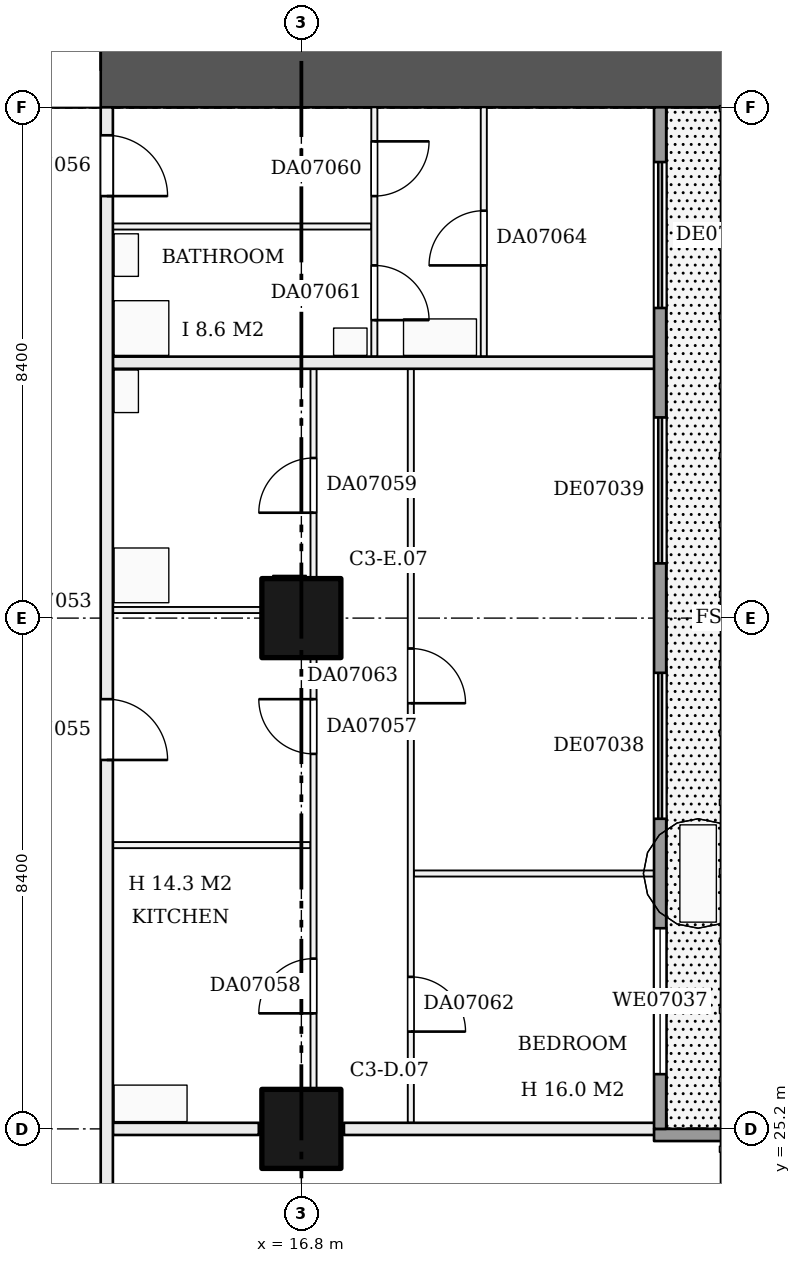
"""IFC4 building model, lengths in metres.
Left out: names, types, materials, properties, quantities, classifications, styles, units other than length and angle.
Written with IfcOpenShell. Run it as: python <this file> out.ifc"""

import sys

from ifc_helpers import new_model, si_unit, direction, frame, frame_2d, origin, origin_2d, place, context, subcontext, project, spatial, rectangle, extrude, element, fill, save


model = new_model("IFC4")
c1 = context("Model", 3, precision=1e-05, world=origin(), true_north=direction((0.0, 1.0)))
c2 = subcontext(c1, "Body", "Model", "MODEL_VIEW")
j1 = project(units=[si_unit("LENGTHUNIT", "METRE"), si_unit("PLANEANGLEUNIT", "RADIAN")], contexts=[c1])
p1 = place(None, origin())
s1 = spatial("IfcSite", under=j1, at=p1, CompositionType="ELEMENT")
p2 = place(p1, origin())
s2 = spatial("IfcBuilding", under=s1, at=p2, CompositionType="ELEMENT")
p3 = place(p2, frame((0.0, 0.0, 35.7)))
s3 = spatial("IfcBuildingStorey", under=s2, at=p3, CompositionType="ELEMENT", Elevation=35.7)
for number, where, z_axis, x_axis in (
    (1, (16.8, 25.2, 0.0), (0.0, 0.0, 1.0), (1.0, 0.0, 0.0)),
    (2, (16.8, 33.6, 0.0), (0.0, 0.0, 1.0), (1.0, 0.0, 0.0)),
):
    element("IfcColumn", number, at=place(p3, frame(where, z_axis=z_axis, x_axis=x_axis)), inside=s3, PredefinedType="COLUMN", context=c2, shape_type="SweptSolid", body=[
        extrude(rectangle(XDim=1.3, YDim=1.3, at=origin_2d()), origin(), (0.0, 0.0, 1.0), 3.22),
    ])
p4 = place(p3, frame((9.6, 42.6, 0.0), z_axis=(0.0, 0.0, 1.0), x_axis=(1.0, 0.0, 0.0)))
e3 = element("IfcWall", 3, at=p4, inside=s3, PredefinedType="SHEAR", context=c2, shape_type="SweptSolid", body=[
    extrude(rectangle(XDim=14.4, YDim=1.2, at=frame_2d((7.2, 0.0))), origin(), (0.0, 0.0, 1.0), 3.22),
])
p5 = place(p4, frame((2.1, 0.0, 0.0)))
e4 = element("IfcOpeningElement", 4, at=p5, cuts=e3, PredefinedType="OPENING", context=c2, shape_type="SweptSolid", body=[
    extrude(rectangle(XDim=1.8, YDim=2.1, at=frame_2d((0.9, 1.05))), frame((0.0, 0.61, 0.0), z_axis=(0.0, -1.0, 0.0), x_axis=(1.0, 0.0, 0.0)), (0.0, 0.0, 1.0), 1.22),
])
p6 = place(p3, frame((13.7, 25.2, 0.0), z_axis=(0.0, 0.0, 1.0), x_axis=(1.0, 0.0, 0.0)))
e5 = element("IfcWall", 5, at=p6, inside=s3, PredefinedType="PARTITIONING", context=c2, shape_type="SweptSolid", body=[
    extrude(rectangle(XDim=2.4, YDim=0.2, at=frame_2d((1.2, 0.0))), origin(), (0.0, 0.0, 1.0), 3.22),
])
p7 = place(p3, frame((17.5, 25.2, 0.0), z_axis=(0.0, 0.0, 1.0), x_axis=(1.0, 0.0, 0.0)))
e6 = element("IfcWall", 6, at=p7, inside=s3, PredefinedType="PARTITIONING", context=c2, shape_type="SweptSolid", body=[
    extrude(rectangle(XDim=5.2, YDim=0.2, at=frame_2d((2.6, 0.0))), origin(), (0.0, 0.0, 1.0), 3.22),
])
p8 = place(p3, frame((18.65, 29.4, 0.0), z_axis=(0.0, 0.0, 1.0), x_axis=(1.0, 0.0, 0.0)))
e7 = element("IfcWall", 7, at=p8, inside=s3, PredefinedType="PARTITIONING", context=c2, shape_type="SweptSolid", body=[
    extrude(rectangle(XDim=4.05, YDim=0.1, at=frame_2d((2.025, 0.0))), origin(), (0.0, 0.0, 1.0), 3.22),
])
for number, where, z_axis, x_axis in (
    (8, (13.7, 29.867, 0.0), (0.0, 0.0, 1.0), (1.0, 0.0, 0.0)),
    (9, (13.7, 33.733, 0.0), (0.0, 0.0, 1.0), (1.0, 0.0, 0.0)),
):
    element("IfcWall", number, at=place(p3, frame(where, z_axis=z_axis, x_axis=x_axis)), inside=s3, PredefinedType="PARTITIONING", context=c2, shape_type="SweptSolid", body=[
        extrude(rectangle(XDim=3.25, YDim=0.1, at=frame_2d((1.625, 0.0))), origin(), (0.0, 0.0, 1.0), 3.22),
    ])
p9 = place(p3, frame((13.7, 37.8, 0.0), z_axis=(0.0, 0.0, 1.0), x_axis=(1.0, 0.0, 0.0)))
e10 = element("IfcWall", 10, at=p9, inside=s3, PredefinedType="PARTITIONING", context=c2, shape_type="SweptSolid", body=[
    extrude(rectangle(XDim=9.0, YDim=0.2, at=frame_2d((4.5, 0.0))), origin(), (0.0, 0.0, 1.0), 3.22),
])
p10 = place(p3, frame((13.7, 40.04, 0.0), z_axis=(0.0, 0.0, 1.0), x_axis=(1.0, 0.0, 0.0)))
e11 = element("IfcWall", 11, at=p10, inside=s3, PredefinedType="PARTITIONING", context=c2, shape_type="SweptSolid", body=[
    extrude(rectangle(XDim=4.25, YDim=0.1, at=frame_2d((2.125, 0.0))), origin(), (0.0, 0.0, 1.0), 3.22),
])
p11 = place(p3, frame((13.6, 20.8, 0.0), z_axis=(0.0, 0.0, 1.0), x_axis=(0.0, 1.0, 0.0)))
e12 = element("IfcWall", 12, at=p11, inside=s3, PredefinedType="PARTITIONING", context=c2, shape_type="SweptSolid", body=[
    extrude(rectangle(XDim=21.2, YDim=0.2, at=frame_2d((10.6, 0.0))), origin(), (0.0, 0.0, 1.0), 3.22),
])
p12 = place(p11, frame((10.467, 0.0, 0.0)))
e13 = element("IfcOpeningElement", 13, at=p12, cuts=e12, PredefinedType="OPENING", context=c2, shape_type="SweptSolid", body=[
    extrude(rectangle(XDim=1.0, YDim=2.1, at=frame_2d((0.5, 1.05))), frame((0.0, 0.11, 0.0), z_axis=(0.0, -1.0, 0.0), x_axis=(1.0, 0.0, 0.0)), (0.0, 0.0, 1.0), 0.22),
])
p13 = place(p11, frame((19.74, 0.0, 0.0)))
e14 = element("IfcOpeningElement", 14, at=p13, cuts=e12, PredefinedType="OPENING", context=c2, shape_type="SweptSolid", body=[
    extrude(rectangle(XDim=1.0, YDim=2.1, at=frame_2d((0.5, 1.05))), frame((0.0, 0.11, 0.0), z_axis=(0.0, -1.0, 0.0), x_axis=(1.0, 0.0, 0.0)), (0.0, 0.0, 1.0), 0.22),
])
p14 = place(p3, frame((17.0, 25.3, 0.0), z_axis=(0.0, 0.0, 1.0), x_axis=(0.0, 1.0, 0.0)))
e15 = element("IfcWall", 15, at=p14, inside=s3, PredefinedType="PARTITIONING", context=c2, shape_type="SweptSolid", body=[
    extrude(rectangle(XDim=12.4, YDim=0.1, at=frame_2d((6.2, 0.0))), origin(), (0.0, 0.0, 1.0), 3.22),
])
p15 = place(p14, frame((6.067, 0.0, 0.0)))
e16 = element("IfcOpeningElement", 16, at=p15, cuts=e15, PredefinedType="OPENING", context=c2, shape_type="SweptSolid", body=[
    extrude(rectangle(XDim=0.9, YDim=2.1, at=frame_2d((0.45, 1.05))), frame((0.0, 0.06, 0.0), z_axis=(0.0, -1.0, 0.0), x_axis=(1.0, 0.0, 0.0)), (0.0, 0.0, 1.0), 0.12),
])
p16 = place(p14, frame((1.8, 0.0, 0.0)))
e17 = element("IfcOpeningElement", 17, at=p16, cuts=e15, PredefinedType="OPENING", context=c2, shape_type="SweptSolid", body=[
    extrude(rectangle(XDim=0.9, YDim=2.1, at=frame_2d((0.45, 1.05))), frame((0.0, 0.06, 0.0), z_axis=(0.0, -1.0, 0.0), x_axis=(1.0, 0.0, 0.0)), (0.0, 0.0, 1.0), 0.12),
])
p17 = place(p14, frame((10.033, 0.0, 0.0)))
e18 = element("IfcOpeningElement", 18, at=p17, cuts=e15, PredefinedType="OPENING", context=c2, shape_type="SweptSolid", body=[
    extrude(rectangle(XDim=0.9, YDim=2.1, at=frame_2d((0.45, 1.05))), frame((0.0, 0.06, 0.0), z_axis=(0.0, -1.0, 0.0), x_axis=(1.0, 0.0, 0.0)), (0.0, 0.0, 1.0), 0.12),
])
p18 = place(p3, frame((18.0, 37.9, 0.0), z_axis=(0.0, 0.0, 1.0), x_axis=(0.0, 1.0, 0.0)))
e19 = element("IfcWall", 19, at=p18, inside=s3, PredefinedType="PARTITIONING", context=c2, shape_type="SweptSolid", body=[
    extrude(rectangle(XDim=4.1, YDim=0.1, at=frame_2d((2.05, 0.0))), origin(), (0.0, 0.0, 1.0), 3.22),
])
p19 = place(p18, frame((2.64, 0.0, 0.0)))
e20 = element("IfcOpeningElement", 20, at=p19, cuts=e19, PredefinedType="OPENING", context=c2, shape_type="SweptSolid", body=[
    extrude(rectangle(XDim=0.9, YDim=2.1, at=frame_2d((0.45, 1.05))), frame((0.0, 0.06, 0.0), z_axis=(0.0, -1.0, 0.0), x_axis=(1.0, 0.0, 0.0)), (0.0, 0.0, 1.0), 0.12),
])
p20 = place(p18, frame((0.6, 0.0, 0.0)))
e21 = element("IfcOpeningElement", 21, at=p20, cuts=e19, PredefinedType="OPENING", context=c2, shape_type="SweptSolid", body=[
    extrude(rectangle(XDim=0.9, YDim=2.1, at=frame_2d((0.45, 1.05))), frame((0.0, 0.06, 0.0), z_axis=(0.0, -1.0, 0.0), x_axis=(1.0, 0.0, 0.0)), (0.0, 0.0, 1.0), 0.12),
])
p21 = place(p3, frame((18.6, 25.3, 0.0), z_axis=(0.0, 0.0, 1.0), x_axis=(0.0, 1.0, 0.0)))
e22 = element("IfcWall", 22, at=p21, inside=s3, PredefinedType="PARTITIONING", context=c2, shape_type="SweptSolid", body=[
    extrude(rectangle(XDim=12.4, YDim=0.1, at=frame_2d((6.2, 0.0))), origin(), (0.0, 0.0, 1.0), 3.22),
])
p22 = place(p21, frame((1.5, 0.0, 0.0)))
e23 = element("IfcOpeningElement", 23, at=p22, cuts=e22, PredefinedType="OPENING", context=c2, shape_type="SweptSolid", body=[
    extrude(rectangle(XDim=0.9, YDim=2.1, at=frame_2d((0.45, 1.05))), frame((0.0, 0.06, 0.0), z_axis=(0.0, -1.0, 0.0), x_axis=(1.0, 0.0, 0.0)), (0.0, 0.0, 1.0), 0.12),
])
p23 = place(p21, frame((6.9, 0.0, 0.0)))
e24 = element("IfcOpeningElement", 24, at=p23, cuts=e22, PredefinedType="OPENING", context=c2, shape_type="SweptSolid", body=[
    extrude(rectangle(XDim=0.9, YDim=2.1, at=frame_2d((0.45, 1.05))), frame((0.0, 0.06, 0.0), z_axis=(0.0, -1.0, 0.0), x_axis=(1.0, 0.0, 0.0)), (0.0, 0.0, 1.0), 0.12),
])
p24 = place(p3, frame((19.8, 37.9, 0.0), z_axis=(0.0, 0.0, 1.0), x_axis=(0.0, 1.0, 0.0)))
e25 = element("IfcWall", 25, at=p24, inside=s3, PredefinedType="PARTITIONING", context=c2, shape_type="SweptSolid", body=[
    extrude(rectangle(XDim=4.1, YDim=0.1, at=frame_2d((2.05, 0.0))), origin(), (0.0, 0.0, 1.0), 3.22),
])
p25 = place(p24, frame((1.5, 0.0, 0.0)))
e26 = element("IfcOpeningElement", 26, at=p25, cuts=e25, PredefinedType="OPENING", context=c2, shape_type="SweptSolid", body=[
    extrude(rectangle(XDim=0.9, YDim=2.1, at=frame_2d((0.45, 1.05))), frame((0.0, 0.06, 0.0), z_axis=(0.0, -1.0, 0.0), x_axis=(1.0, 0.0, 0.0)), (0.0, 0.0, 1.0), 0.12),
])
p26 = place(p3, frame((24.5, 25.1, 0.0), z_axis=(0.0, 0.0, 1.0), x_axis=(-1.0, 0.0, 0.0)))
e27 = element("IfcWall", 27, at=p26, inside=s3, PredefinedType="SOLIDWALL", context=c2, shape_type="SweptSolid", body=[
    extrude(rectangle(XDim=1.9, YDim=0.2, at=frame_2d((0.95, 0.0))), origin(), (0.0, 0.0, 1.0), 3.22),
])
p27 = place(p3, frame((22.7, 25.2, 0.0), z_axis=(0.0, 0.0, 1.0), x_axis=(0.0, 1.0, 0.0)))
e28 = element("IfcWall", 28, at=p27, inside=s3, PredefinedType="SOLIDWALL", context=c2, shape_type="SweptSolid", body=[
    extrude(rectangle(XDim=16.8, YDim=0.2, at=frame_2d((8.4, 0.0))), origin(), (0.0, 0.0, 1.0), 3.22),
])
p28 = place(p27, frame((0.9, 0.0, 0.9)))
e29 = element("IfcOpeningElement", 29, at=p28, cuts=e28, PredefinedType="OPENING", context=c2, shape_type="SweptSolid", body=[
    extrude(rectangle(XDim=2.4, YDim=1.5, at=frame_2d((1.2, 0.75))), frame((0.0, 0.11, 0.0), z_axis=(0.0, -1.0, 0.0), x_axis=(1.0, 0.0, 0.0)), (0.0, 0.0, 1.0), 0.22),
])
p29 = place(p27, frame((5.1, 0.0, 0.0)))
e30 = element("IfcOpeningElement", 30, at=p29, cuts=e28, PredefinedType="OPENING", context=c2, shape_type="SweptSolid", body=[
    extrude(rectangle(XDim=2.4, YDim=2.2, at=frame_2d((1.2, 1.1))), frame((0.0, 0.11, 0.0), z_axis=(0.0, -1.0, 0.0), x_axis=(1.0, 0.0, 0.0)), (0.0, 0.0, 1.0), 0.22),
])
p30 = place(p27, frame((9.3, 0.0, 0.0)))
e31 = element("IfcOpeningElement", 31, at=p30, cuts=e28, PredefinedType="OPENING", context=c2, shape_type="SweptSolid", body=[
    extrude(rectangle(XDim=2.4, YDim=2.2, at=frame_2d((1.2, 1.1))), frame((0.0, 0.11, 0.0), z_axis=(0.0, -1.0, 0.0), x_axis=(1.0, 0.0, 0.0)), (0.0, 0.0, 1.0), 0.22),
])
p31 = place(p27, frame((13.5, 0.0, 0.0)))
e32 = element("IfcOpeningElement", 32, at=p31, cuts=e28, PredefinedType="OPENING", context=c2, shape_type="SweptSolid", body=[
    extrude(rectangle(XDim=2.4, YDim=2.2, at=frame_2d((1.2, 1.1))), frame((0.0, 0.11, 0.0), z_axis=(0.0, -1.0, 0.0), x_axis=(1.0, 0.0, 0.0)), (0.0, 0.0, 1.0), 0.22),
])
p32 = place(p5, origin())
e33 = element("IfcDoor", 33, at=p32, inside=s3, OperationType="DOUBLE_DOOR_SINGLE_SWING", PredefinedType="DOOR", context=c2, shape_type="SweptSolid", body=[
    extrude(rectangle(XDim=1.8, YDim=2.1, at=frame_2d((0.9, 1.05))), frame((0.0, 0.025, 0.0), z_axis=(0.0, -1.0, 0.0), x_axis=(1.0, 0.0, 0.0)), (0.0, 0.0, 1.0), 0.05),
])
fill(e4, e33)
p33 = place(p12, frame((1.0, 0.0, 0.0), z_axis=(0.0, 0.0, 1.0), x_axis=(-1.0, 0.0, 0.0)))
e34 = element("IfcDoor", 34, at=p33, inside=s3, OperationType="SINGLE_SWING_RIGHT", PredefinedType="DOOR", context=c2, shape_type="SweptSolid", body=[
    extrude(rectangle(XDim=1.0, YDim=2.1, at=frame_2d((0.5, 1.05))), frame((0.0, 0.025, 0.0), z_axis=(0.0, -1.0, 0.0), x_axis=(1.0, 0.0, 0.0)), (0.0, 0.0, 1.0), 0.05),
])
fill(e13, e34)
p34 = place(p13, frame((1.0, 0.0, 0.0), z_axis=(0.0, 0.0, 1.0), x_axis=(-1.0, 0.0, 0.0)))
e35 = element("IfcDoor", 35, at=p34, inside=s3, OperationType="SINGLE_SWING_RIGHT", PredefinedType="DOOR", context=c2, shape_type="SweptSolid", body=[
    extrude(rectangle(XDim=1.0, YDim=2.1, at=frame_2d((0.5, 1.05))), frame((0.0, 0.025, 0.0), z_axis=(0.0, -1.0, 0.0), x_axis=(1.0, 0.0, 0.0)), (0.0, 0.0, 1.0), 0.05),
])
fill(e14, e35)
p35 = place(p15, origin())
e36 = element("IfcDoor", 36, at=p35, inside=s3, OperationType="SINGLE_SWING_RIGHT", PredefinedType="DOOR", context=c2, shape_type="SweptSolid", body=[
    extrude(rectangle(XDim=0.9, YDim=2.1, at=frame_2d((0.45, 1.05))), frame((0.0, 0.025, 0.0), z_axis=(0.0, -1.0, 0.0), x_axis=(1.0, 0.0, 0.0)), (0.0, 0.0, 1.0), 0.05),
])
fill(e16, e36)
p36 = place(p16, origin())
e37 = element("IfcDoor", 37, at=p36, inside=s3, OperationType="SINGLE_SWING_LEFT", PredefinedType="DOOR", context=c2, shape_type="SweptSolid", body=[
    extrude(rectangle(XDim=0.9, YDim=2.1, at=frame_2d((0.45, 1.05))), frame((0.0, 0.025, 0.0), z_axis=(0.0, -1.0, 0.0), x_axis=(1.0, 0.0, 0.0)), (0.0, 0.0, 1.0), 0.05),
])
fill(e17, e37)
p37 = place(p17, origin())
e38 = element("IfcDoor", 38, at=p37, inside=s3, OperationType="SINGLE_SWING_LEFT", PredefinedType="DOOR", context=c2, shape_type="SweptSolid", body=[
    extrude(rectangle(XDim=0.9, YDim=2.1, at=frame_2d((0.45, 1.05))), frame((0.0, 0.025, 0.0), z_axis=(0.0, -1.0, 0.0), x_axis=(1.0, 0.0, 0.0)), (0.0, 0.0, 1.0), 0.05),
])
fill(e18, e38)
p38 = place(p19, frame((0.9, 0.0, 0.0), z_axis=(0.0, 0.0, 1.0), x_axis=(-1.0, 0.0, 0.0)))
e39 = element("IfcDoor", 39, at=p38, inside=s3, OperationType="SINGLE_SWING_LEFT", PredefinedType="DOOR", context=c2, shape_type="SweptSolid", body=[
    extrude(rectangle(XDim=0.9, YDim=2.1, at=frame_2d((0.45, 1.05))), frame((0.0, 0.025, 0.0), z_axis=(0.0, -1.0, 0.0), x_axis=(1.0, 0.0, 0.0)), (0.0, 0.0, 1.0), 0.05),
])
fill(e20, e39)
p39 = place(p20, frame((0.9, 0.0, 0.0), z_axis=(0.0, 0.0, 1.0), x_axis=(-1.0, 0.0, 0.0)))
e40 = element("IfcDoor", 40, at=p39, inside=s3, OperationType="SINGLE_SWING_RIGHT", PredefinedType="DOOR", context=c2, shape_type="SweptSolid", body=[
    extrude(rectangle(XDim=0.9, YDim=2.1, at=frame_2d((0.45, 1.05))), frame((0.0, 0.025, 0.0), z_axis=(0.0, -1.0, 0.0), x_axis=(1.0, 0.0, 0.0)), (0.0, 0.0, 1.0), 0.05),
])
fill(e21, e40)
p40 = place(p22, frame((0.9, 0.0, 0.0), z_axis=(0.0, 0.0, 1.0), x_axis=(-1.0, 0.0, 0.0)))
e41 = element("IfcDoor", 41, at=p40, inside=s3, OperationType="SINGLE_SWING_RIGHT", PredefinedType="DOOR", context=c2, shape_type="SweptSolid", body=[
    extrude(rectangle(XDim=0.9, YDim=2.1, at=frame_2d((0.45, 1.05))), frame((0.0, 0.025, 0.0), z_axis=(0.0, -1.0, 0.0), x_axis=(1.0, 0.0, 0.0)), (0.0, 0.0, 1.0), 0.05),
])
fill(e23, e41)
p41 = place(p23, frame((0.9, 0.0, 0.0), z_axis=(0.0, 0.0, 1.0), x_axis=(-1.0, 0.0, 0.0)))
e42 = element("IfcDoor", 42, at=p41, inside=s3, OperationType="SINGLE_SWING_RIGHT", PredefinedType="DOOR", context=c2, shape_type="SweptSolid", body=[
    extrude(rectangle(XDim=0.9, YDim=2.1, at=frame_2d((0.45, 1.05))), frame((0.0, 0.025, 0.0), z_axis=(0.0, -1.0, 0.0), x_axis=(1.0, 0.0, 0.0)), (0.0, 0.0, 1.0), 0.05),
])
fill(e24, e42)
p42 = place(p25, origin())
e43 = element("IfcDoor", 43, at=p42, inside=s3, OperationType="SINGLE_SWING_LEFT", PredefinedType="DOOR", context=c2, shape_type="SweptSolid", body=[
    extrude(rectangle(XDim=0.9, YDim=2.1, at=frame_2d((0.45, 1.05))), frame((0.0, 0.025, 0.0), z_axis=(0.0, -1.0, 0.0), x_axis=(1.0, 0.0, 0.0)), (0.0, 0.0, 1.0), 0.05),
])
fill(e26, e43)
p43 = place(p28, origin())
e44 = element("IfcWindow", 44, at=p43, inside=s3, PartitioningType="SINGLE_PANEL", PredefinedType="WINDOW", context=c2, shape_type="SweptSolid", body=[
    extrude(rectangle(XDim=2.4, YDim=1.5, at=frame_2d((1.2, 0.75))), frame((0.0, 0.03, 0.0), z_axis=(0.0, -1.0, 0.0), x_axis=(1.0, 0.0, 0.0)), (0.0, 0.0, 1.0), 0.06),
])
fill(e29, e44)
p44 = place(p29, origin())
e45 = element("IfcDoor", 45, at=p44, inside=s3, OperationType="DOUBLE_DOOR_SLIDING", PredefinedType="DOOR", context=c2, shape_type="SweptSolid", body=[
    extrude(rectangle(XDim=2.4, YDim=2.2, at=frame_2d((1.2, 1.1))), frame((0.0, 0.025, 0.0), z_axis=(0.0, -1.0, 0.0), x_axis=(1.0, 0.0, 0.0)), (0.0, 0.0, 1.0), 0.05),
])
fill(e30, e45)
p45 = place(p30, origin())
e46 = element("IfcDoor", 46, at=p45, inside=s3, OperationType="DOUBLE_DOOR_SLIDING", PredefinedType="DOOR", context=c2, shape_type="SweptSolid", body=[
    extrude(rectangle(XDim=2.4, YDim=2.2, at=frame_2d((1.2, 1.1))), frame((0.0, 0.025, 0.0), z_axis=(0.0, -1.0, 0.0), x_axis=(1.0, 0.0, 0.0)), (0.0, 0.0, 1.0), 0.05),
])
fill(e31, e46)
p46 = place(p31, origin())
e47 = element("IfcDoor", 47, at=p46, inside=s3, OperationType="DOUBLE_DOOR_SLIDING", PredefinedType="DOOR", context=c2, shape_type="SweptSolid", body=[
    extrude(rectangle(XDim=2.4, YDim=2.2, at=frame_2d((1.2, 1.1))), frame((0.0, 0.025, 0.0), z_axis=(0.0, -1.0, 0.0), x_axis=(1.0, 0.0, 0.0)), (0.0, 0.0, 1.0), 0.05),
])
fill(e32, e47)
save(model, sys.argv[1])
